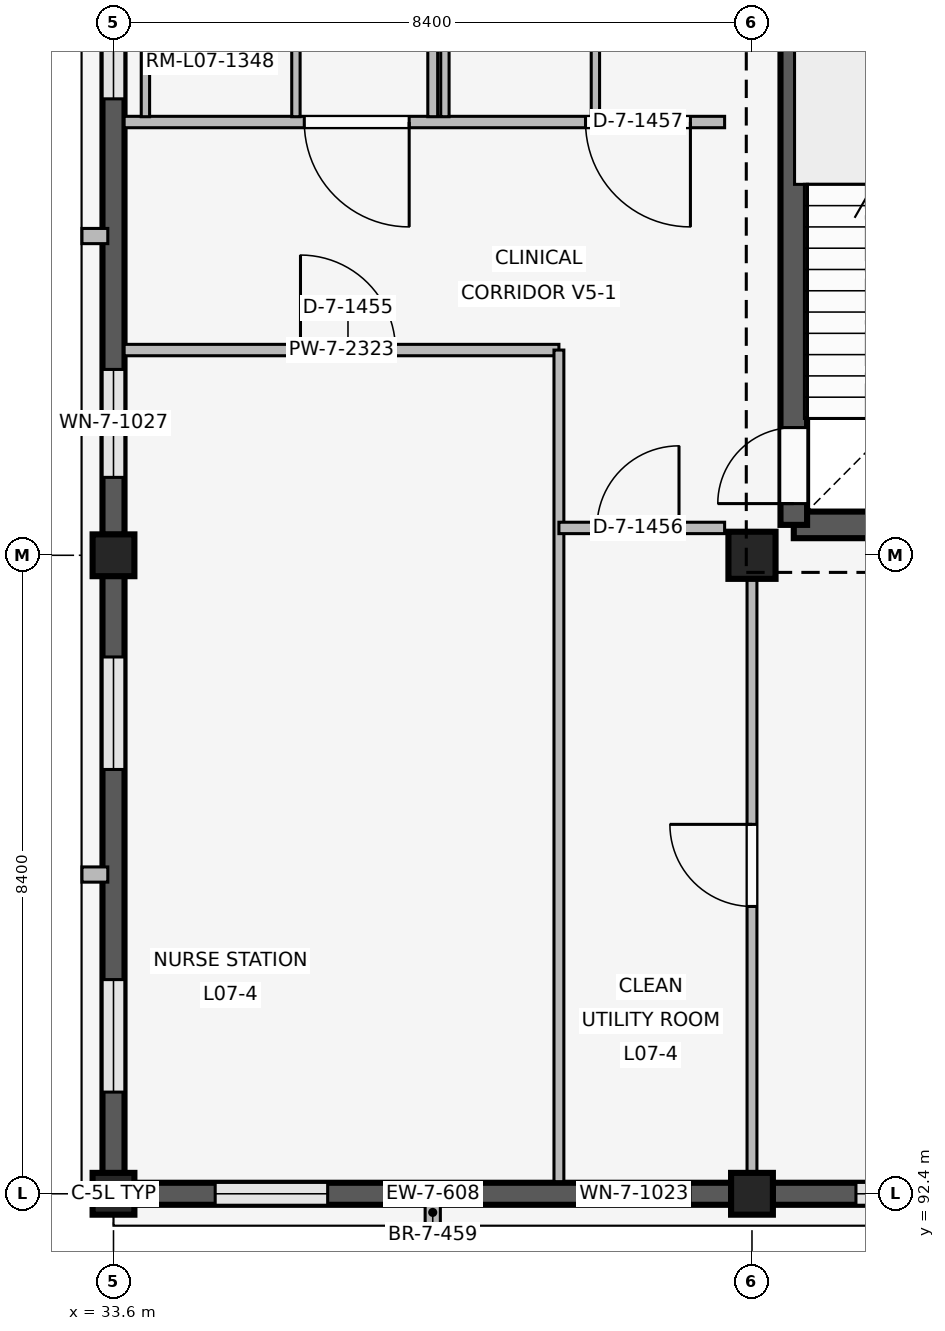
"""IFC4 building model, lengths in metres.
Left out: names, types, materials, properties, quantities, classifications, styles, units other than length and angle.
Written with IfcOpenShell. Run it as: python <this file> out.ifc"""

import sys

from ifc_helpers import new_model, si_unit, direction, frame, frame_2d, origin, origin_2d, place, context, subcontext, project, spatial, rectangle, extrude, element, fill, save


model = new_model("IFC4")
c1 = context("Model", 3, precision=1e-05, world=origin(), true_north=direction((0.0, 1.0)))
c2 = subcontext(c1, "Body", "Model", "MODEL_VIEW")
j1 = project(units=[si_unit("LENGTHUNIT", "METRE"), si_unit("PLANEANGLEUNIT", "RADIAN")], contexts=[c1])
p1 = place(None, origin())
s1 = spatial("IfcSite", under=j1, at=p1, CompositionType="ELEMENT")
p2 = place(p1, origin())
s2 = spatial("IfcBuilding", under=s1, at=p2, CompositionType="ELEMENT")
p3 = place(p2, frame((0.0, 0.0, 28.8)))
s3 = spatial("IfcBuildingStorey", under=s2, at=p3, CompositionType="ELEMENT", Elevation=28.8)
for number, where, z_axis, x_axis in (
    (1, (33.6, 92.4, 0.0), (0.0, 0.0, 1.0), (1.0, 0.0, 0.0)),
    (2, (33.6, 100.8, 0.0), (0.0, 0.0, 1.0), (1.0, 0.0, 0.0)),
    (3, (42.0, 92.4, 0.0), (0.0, 0.0, 1.0), (1.0, 0.0, 0.0)),
):
    element("IfcColumn", number, at=place(p3, frame(where, z_axis=z_axis, x_axis=x_axis)), inside=s3, PredefinedType="COLUMN", context=c2, shape_type="SweptSolid", body=[
        extrude(rectangle(XDim=0.55, YDim=0.55, at=origin_2d()), origin(), (0.0, 0.0, 1.0), 4.2),
    ])
p4 = place(p3, frame((42.0, 100.8, 0.0), z_axis=(0.0, 0.0, 1.0), x_axis=(1.0, 0.0, 0.0)))
e4 = element("IfcColumn", 4, at=p4, inside=s3, PredefinedType="COLUMN", context=c2, shape_type="SweptSolid", body=[
    extrude(rectangle(XDim=0.62, YDim=0.62, at=origin_2d()), origin(), (0.0, 0.0, 1.0), 4.2),
])
p5 = place(p3, frame((41.73, 92.4, 0.0), z_axis=(0.0, 0.0, 1.0), x_axis=(-1.0, 0.0, 0.0)))
e5 = element("IfcWall", 5, at=p5, inside=s3, PredefinedType="SOLIDWALL", context=c2, shape_type="SweptSolid", body=[
    extrude(rectangle(XDim=7.86, YDim=0.29, at=frame_2d((3.93, 0.0))), origin(), (0.0, 0.0, 1.0), 3.34),
])
p6 = place(p5, frame((0.545, 0.0, 0.85)))
e6 = element("IfcOpeningElement", 6, at=p6, cuts=e5, PredefinedType="OPENING", context=c2, shape_type="SweptSolid", body=[
    extrude(rectangle(XDim=1.48, YDim=1.6, at=frame_2d((0.74, 0.8))), frame((0.0, 0.155, 0.0), z_axis=(0.0, -1.0, 0.0), x_axis=(1.0, 0.0, 0.0)), (0.0, 0.0, 1.0), 0.31),
])
p7 = place(p5, frame((5.312, 0.0, 0.85)))
e7 = element("IfcOpeningElement", 7, at=p7, cuts=e5, PredefinedType="OPENING", context=c2, shape_type="SweptSolid", body=[
    extrude(rectangle(XDim=1.48, YDim=1.6, at=frame_2d((0.74, 0.8))), frame((0.0, 0.155, 0.0), z_axis=(0.0, -1.0, 0.0), x_axis=(1.0, 0.0, 0.0)), (0.0, 0.0, 1.0), 0.31),
])
p8 = place(p3, frame((37.8, 92.325, 0.0), z_axis=(0.0, 0.0, 1.0), x_axis=(0.0, -1.0, 0.0)))
e8 = element("IfcWall", 8, at=p8, inside=s3, PredefinedType="ELEMENTEDWALL", context=c2, shape_type="SweptSolid", body=[
    extrude(rectangle(XDim=0.34, YDim=0.2, at=frame_2d((0.17, 0.0))), origin(), (0.0, 0.0, 1.0), 3.32),
])
p9 = place(p3, frame((33.6, 92.67, 0.0), z_axis=(0.0, 0.0, 1.0), x_axis=(0.0, 1.0, 0.0)))
e9 = element("IfcWall", 9, at=p9, inside=s3, PredefinedType="SOLIDWALL", context=c2, shape_type="SweptSolid", body=[
    extrude(rectangle(XDim=7.86, YDim=0.29, at=frame_2d((3.93, 0.0))), origin(), (0.0, 0.0, 1.0), 3.34),
])
p10 = place(p9, frame((1.068, 0.0, 0.85)))
e10 = element("IfcOpeningElement", 10, at=p10, cuts=e9, PredefinedType="OPENING", context=c2, shape_type="SweptSolid", body=[
    extrude(rectangle(XDim=1.48, YDim=1.6, at=frame_2d((0.74, 0.8))), frame((0.0, 0.155, 0.0), z_axis=(0.0, -1.0, 0.0), x_axis=(1.0, 0.0, 0.0)), (0.0, 0.0, 1.0), 0.31),
])
p11 = place(p9, frame((5.312, 0.0, 0.85)))
e11 = element("IfcOpeningElement", 11, at=p11, cuts=e9, PredefinedType="OPENING", context=c2, shape_type="SweptSolid", body=[
    extrude(rectangle(XDim=1.48, YDim=1.6, at=frame_2d((0.74, 0.8))), frame((0.0, 0.155, 0.0), z_axis=(0.0, -1.0, 0.0), x_axis=(1.0, 0.0, 0.0)), (0.0, 0.0, 1.0), 0.31),
])
p12 = place(p3, frame((33.525, 96.6, 0.0), z_axis=(0.0, 0.0, 1.0), x_axis=(-1.0, 0.0, 0.0)))
e12 = element("IfcWall", 12, at=p12, inside=s3, PredefinedType="ELEMENTEDWALL", context=c2, shape_type="SweptSolid", body=[
    extrude(rectangle(XDim=0.34, YDim=0.2, at=frame_2d((0.17, 0.0))), origin(), (0.0, 0.0, 1.0), 3.32),
])
p13 = place(p3, frame((33.6, 101.07, 0.0), z_axis=(0.0, 0.0, 1.0), x_axis=(0.0, 1.0, 0.0)))
e13 = element("IfcWall", 13, at=p13, inside=s3, PredefinedType="SOLIDWALL", context=c2, shape_type="SweptSolid", body=[
    extrude(rectangle(XDim=7.86, YDim=0.29, at=frame_2d((3.93, 0.0))), origin(), (0.0, 0.0, 1.0), 3.34),
])
p14 = place(p13, frame((0.755, 0.0, 0.85)))
e14 = element("IfcOpeningElement", 14, at=p14, cuts=e13, PredefinedType="OPENING", context=c2, shape_type="SweptSolid", body=[
    extrude(rectangle(XDim=1.42, YDim=1.45, at=frame_2d((0.71, 0.725))), frame((0.0, 0.155, 0.0), z_axis=(0.0, -1.0, 0.0), x_axis=(1.0, 0.0, 0.0)), (0.0, 0.0, 1.0), 0.31),
])
p15 = place(p13, frame((5.735, 0.0, 0.85)))
e15 = element("IfcOpeningElement", 15, at=p15, cuts=e13, PredefinedType="OPENING", context=c2, shape_type="SweptSolid", body=[
    extrude(rectangle(XDim=1.42, YDim=1.45, at=frame_2d((0.71, 0.725))), frame((0.0, 0.155, 0.0), z_axis=(0.0, -1.0, 0.0), x_axis=(1.0, 0.0, 0.0)), (0.0, 0.0, 1.0), 0.31),
])
p16 = place(p3, frame((33.525, 105.0, 0.0), z_axis=(0.0, 0.0, 1.0), x_axis=(-1.0, 0.0, 0.0)))
e16 = element("IfcWall", 16, at=p16, inside=s3, PredefinedType="ELEMENTEDWALL", context=c2, shape_type="SweptSolid", body=[
    extrude(rectangle(XDim=0.34, YDim=0.2, at=frame_2d((0.17, 0.0))), origin(), (0.0, 0.0, 1.0), 3.32),
])
p17 = place(p3, frame((50.13, 92.4, 0.0), z_axis=(0.0, 0.0, 1.0), x_axis=(-1.0, 0.0, 0.0)))
e17 = element("IfcWall", 17, at=p17, inside=s3, PredefinedType="SOLIDWALL", context=c2, shape_type="SweptSolid", body=[
    extrude(rectangle(XDim=7.86, YDim=0.29, at=frame_2d((3.93, 0.0))), origin(), (0.0, 0.0, 1.0), 3.34),
])
p18 = place(p17, frame((1.098, 0.0, 0.85)))
e18 = element("IfcOpeningElement", 18, at=p18, cuts=e17, PredefinedType="OPENING", context=c2, shape_type="SweptSolid", body=[
    extrude(rectangle(XDim=1.42, YDim=1.45, at=frame_2d((0.71, 0.725))), frame((0.0, 0.155, 0.0), z_axis=(0.0, -1.0, 0.0), x_axis=(1.0, 0.0, 0.0)), (0.0, 0.0, 1.0), 0.31),
])
p19 = place(p17, frame((5.342, 0.0, 0.85)))
e19 = element("IfcOpeningElement", 19, at=p19, cuts=e17, PredefinedType="OPENING", context=c2, shape_type="SweptSolid", body=[
    extrude(rectangle(XDim=1.42, YDim=1.45, at=frame_2d((0.71, 0.725))), frame((0.0, 0.155, 0.0), z_axis=(0.0, -1.0, 0.0), x_axis=(1.0, 0.0, 0.0)), (0.0, 0.0, 1.0), 0.31),
])
p20 = place(p3, frame((42.55, 101.2, 0.0), z_axis=(0.0, 0.0, 1.0), x_axis=(1.0, 0.0, 0.0)))
e20 = element("IfcWall", 20, at=p20, inside=s3, PredefinedType="SHEAR", context=c2, shape_type="SweptSolid", body=[
    extrude(rectangle(XDim=7.5, YDim=0.35, at=frame_2d((3.75, 0.0))), origin(), (0.0, 0.0, 1.0), 3.94),
])
p21 = place(p20, frame((4.85, 0.0, 0.0)))
e21 = element("IfcOpeningElement", 21, at=p21, cuts=e20, PredefinedType="OPENING", context=c2, shape_type="SweptSolid", body=[
    extrude(rectangle(XDim=1.2, YDim=2.2, at=frame_2d((0.6, 1.1))), frame((0.0, 0.185, 0.0), z_axis=(0.0, -1.0, 0.0), x_axis=(1.0, 0.0, 0.0)), (0.0, 0.0, 1.0), 0.37),
])
p22 = place(p3, frame((42.55, 101.2, 0.0), z_axis=(0.0, 0.0, 1.0), x_axis=(0.0, 1.0, 0.0)))
e22 = element("IfcWall", 22, at=p22, inside=s3, PredefinedType="SHEAR", context=c2, shape_type="SweptSolid", body=[
    extrude(rectangle(XDim=7.55, YDim=0.35, at=frame_2d((3.775, 0.0))), origin(), (0.0, 0.0, 1.0), 3.94),
])
p23 = place(p22, frame((0.28, 0.0, 0.0)))
e23 = element("IfcOpeningElement", 23, at=p23, cuts=e22, PredefinedType="OPENING", context=c2, shape_type="SweptSolid", body=[
    extrude(rectangle(XDim=1.0, YDim=2.15, at=frame_2d((0.5, 1.075))), frame((0.0, 0.185, 0.0), z_axis=(0.0, -1.0, 0.0), x_axis=(1.0, 0.0, 0.0)), (0.0, 0.0, 1.0), 0.37),
])
p24 = place(p3, frame((33.74, 103.5, 0.0), z_axis=(0.0, 0.0, 1.0), x_axis=(1.0, 0.0, 0.0)))
e24 = element("IfcWall", 24, at=p24, inside=s3, PredefinedType="PARTITIONING", context=c2, shape_type="SweptSolid", body=[
    extrude(rectangle(XDim=5.72, YDim=0.15, at=frame_2d((2.86, 0.0))), origin(), (0.0, 0.0, 1.0), 3.32),
])
p25 = place(p24, frame((2.32, 0.0, 0.0)))
e25 = element("IfcOpeningElement", 25, at=p25, cuts=e24, PredefinedType="OPENING", context=c2, shape_type="SweptSolid", body=[
    extrude(rectangle(XDim=1.25, YDim=2.2, at=frame_2d((0.625, 1.1))), frame((0.0, 0.085, 0.0), z_axis=(0.0, -1.0, 0.0), x_axis=(1.0, 0.0, 0.0)), (0.0, 0.0, 1.0), 0.17),
])
p26 = place(p3, frame((39.46, 92.56, 0.0), z_axis=(0.0, 0.0, 1.0), x_axis=(0.0, 1.0, 0.0)))
e26 = element("IfcWall", 26, at=p26, inside=s3, PredefinedType="PARTITIONING", context=c2, shape_type="SweptSolid", body=[
    extrude(rectangle(XDim=10.94, YDim=0.13, at=frame_2d((5.47, 0.0))), origin(), (0.0, 0.0, 1.0), 3.32),
])
p27 = place(p3, frame((39.46, 101.16, 0.0), z_axis=(0.0, 0.0, 1.0), x_axis=(1.0, 0.0, 0.0)))
e27 = element("IfcWall", 27, at=p27, inside=s3, PredefinedType="PARTITIONING", context=c2, shape_type="SweptSolid", body=[
    extrude(rectangle(XDim=2.18, YDim=0.15, at=frame_2d((1.09, 0.0))), origin(), (0.0, 0.0, 1.0), 3.32),
])
p28 = place(p27, frame((0.5, 0.0, 0.0)))
e28 = element("IfcOpeningElement", 28, at=p28, cuts=e27, PredefinedType="OPENING", context=c2, shape_type="SweptSolid", body=[
    extrude(rectangle(XDim=1.08, YDim=2.15, at=frame_2d((0.54, 1.075))), frame((0.0, 0.085, 0.0), z_axis=(0.0, -1.0, 0.0), x_axis=(1.0, 0.0, 0.0)), (0.0, 0.0, 1.0), 0.17),
])
p29 = place(p3, frame((41.64, 106.5, 0.0), z_axis=(0.0, 0.0, 1.0), x_axis=(-1.0, 0.0, 0.0)))
e29 = element("IfcWall", 29, at=p29, inside=s3, PredefinedType="PARTITIONING", context=c2, shape_type="SweptSolid", body=[
    extrude(rectangle(XDim=7.9, YDim=0.15, at=frame_2d((3.95, 0.0))), origin(), (0.0, 0.0, 1.0), 3.32),
])
p30 = place(p29, frame((0.45, 0.0, 0.0)))
e30 = element("IfcOpeningElement", 30, at=p30, cuts=e29, PredefinedType="OPENING", context=c2, shape_type="SweptSolid", body=[
    extrude(rectangle(XDim=1.38, YDim=2.25, at=frame_2d((0.69, 1.125))), frame((0.0, 0.085, 0.0), z_axis=(0.0, -1.0, 0.0), x_axis=(1.0, 0.0, 0.0)), (0.0, 0.0, 1.0), 0.17),
])
p31 = place(p29, frame((4.15, 0.0, 0.0)))
e31 = element("IfcOpeningElement", 31, at=p31, cuts=e29, PredefinedType="OPENING", context=c2, shape_type="SweptSolid", body=[
    extrude(rectangle(XDim=1.38, YDim=2.25, at=frame_2d((0.69, 1.125))), frame((0.0, 0.085, 0.0), z_axis=(0.0, -1.0, 0.0), x_axis=(1.0, 0.0, 0.0)), (0.0, 0.0, 1.0), 0.17),
])
p32 = place(p3, frame((37.8, 106.57, 0.0), z_axis=(0.0, 0.0, 1.0), x_axis=(0.0, 1.0, 0.0)))
e32 = element("IfcWall", 32, at=p32, inside=s3, PredefinedType="PARTITIONING", context=c2, shape_type="SweptSolid", body=[
    extrude(rectangle(XDim=10.93, YDim=0.13, at=frame_2d((5.465, 0.0))), origin(), (0.0, 0.0, 1.0), 3.32),
])
for number, where, z_axis, x_axis in (
    (33, (34.02, 106.57, 0.0), (0.0, 0.0, 1.0), (0.0, 1.0, 0.0)),
    (34, (36.0, 106.57, 0.0), (0.0, 0.0, 1.0), (0.0, 1.0, 0.0)),
    (35, (37.96, 106.57, 0.0), (0.0, 0.0, 1.0), (0.0, 1.0, 0.0)),
    (36, (39.94, 106.57, 0.0), (0.0, 0.0, 1.0), (0.0, 1.0, 0.0)),
):
    element("IfcWall", number, at=place(p3, frame(where, z_axis=z_axis, x_axis=x_axis)), inside=s3, PredefinedType="PARTITIONING", context=c2, shape_type="SweptSolid", body=[
        extrude(rectangle(XDim=2.61, YDim=0.11, at=frame_2d((1.305, 0.0))), origin(), (0.0, 0.0, 1.0), 3.32),
    ])
p33 = place(p3, frame((42.0, 92.54, 0.0), z_axis=(0.0, 0.0, 1.0), x_axis=(0.0, 1.0, 0.0)))
e37 = element("IfcWall", 37, at=p33, inside=s3, PredefinedType="PARTITIONING", context=c2, shape_type="SweptSolid", body=[
    extrude(rectangle(XDim=8.21, YDim=0.13, at=frame_2d((4.105, 0.0))), origin(), (0.0, 0.0, 1.0), 3.32),
])
p34 = place(p33, frame((3.64, 0.0, 0.0)))
e38 = element("IfcOpeningElement", 38, at=p34, cuts=e37, PredefinedType="OPENING", context=c2, shape_type="SweptSolid", body=[
    extrude(rectangle(XDim=1.08, YDim=2.15, at=frame_2d((0.54, 1.075))), frame((0.0, 0.075, 0.0), z_axis=(0.0, -1.0, 0.0), x_axis=(1.0, 0.0, 0.0)), (0.0, 0.0, 1.0), 0.15),
])
p35 = place(p6, origin())
e39 = element("IfcWindow", 39, at=p35, inside=s3, PartitioningType="SINGLE_PANEL", PredefinedType="WINDOW", context=c2, shape_type="SweptSolid", body=[
    extrude(rectangle(XDim=1.48, YDim=1.6, at=frame_2d((0.74, 0.8))), frame((0.0, 0.03, 0.0), z_axis=(0.0, -1.0, 0.0), x_axis=(1.0, 0.0, 0.0)), (0.0, 0.0, 1.0), 0.06),
])
fill(e6, e39)
p36 = place(p7, origin())
e40 = element("IfcWindow", 40, at=p36, inside=s3, PartitioningType="SINGLE_PANEL", PredefinedType="WINDOW", context=c2, shape_type="SweptSolid", body=[
    extrude(rectangle(XDim=1.48, YDim=1.6, at=frame_2d((0.74, 0.8))), frame((0.0, 0.03, 0.0), z_axis=(0.0, -1.0, 0.0), x_axis=(1.0, 0.0, 0.0)), (0.0, 0.0, 1.0), 0.06),
])
fill(e7, e40)
p37 = place(p10, origin())
e41 = element("IfcWindow", 41, at=p37, inside=s3, PartitioningType="SINGLE_PANEL", PredefinedType="WINDOW", context=c2, shape_type="SweptSolid", body=[
    extrude(rectangle(XDim=1.48, YDim=1.6, at=frame_2d((0.74, 0.8))), frame((0.0, 0.03, 0.0), z_axis=(0.0, -1.0, 0.0), x_axis=(1.0, 0.0, 0.0)), (0.0, 0.0, 1.0), 0.06),
])
fill(e10, e41)
p38 = place(p11, origin())
e42 = element("IfcWindow", 42, at=p38, inside=s3, PartitioningType="SINGLE_PANEL", PredefinedType="WINDOW", context=c2, shape_type="SweptSolid", body=[
    extrude(rectangle(XDim=1.48, YDim=1.6, at=frame_2d((0.74, 0.8))), frame((0.0, 0.03, 0.0), z_axis=(0.0, -1.0, 0.0), x_axis=(1.0, 0.0, 0.0)), (0.0, 0.0, 1.0), 0.06),
])
fill(e11, e42)
p39 = place(p14, origin())
e43 = element("IfcWindow", 43, at=p39, inside=s3, PartitioningType="SINGLE_PANEL", PredefinedType="WINDOW", context=c2, shape_type="SweptSolid", body=[
    extrude(rectangle(XDim=1.42, YDim=1.45, at=frame_2d((0.71, 0.725))), frame((0.0, 0.03, 0.0), z_axis=(0.0, -1.0, 0.0), x_axis=(1.0, 0.0, 0.0)), (0.0, 0.0, 1.0), 0.06),
])
fill(e14, e43)
p40 = place(p15, origin())
e44 = element("IfcWindow", 44, at=p40, inside=s3, PartitioningType="SINGLE_PANEL", PredefinedType="WINDOW", context=c2, shape_type="SweptSolid", body=[
    extrude(rectangle(XDim=1.42, YDim=1.45, at=frame_2d((0.71, 0.725))), frame((0.0, 0.03, 0.0), z_axis=(0.0, -1.0, 0.0), x_axis=(1.0, 0.0, 0.0)), (0.0, 0.0, 1.0), 0.06),
])
fill(e15, e44)
p41 = place(p19, origin())
e45 = element("IfcWindow", 45, at=p41, inside=s3, PartitioningType="SINGLE_PANEL", PredefinedType="WINDOW", context=c2, shape_type="SweptSolid", body=[
    extrude(rectangle(XDim=1.42, YDim=1.45, at=frame_2d((0.71, 0.725))), frame((0.0, 0.03, 0.0), z_axis=(0.0, -1.0, 0.0), x_axis=(1.0, 0.0, 0.0)), (0.0, 0.0, 1.0), 0.06),
])
fill(e19, e45)
p42 = place(p23, origin())
e46 = element("IfcDoor", 46, at=p42, inside=s3, OperationType="SINGLE_SWING_LEFT", PredefinedType="DOOR", context=c2, shape_type="SweptSolid", body=[
    extrude(rectangle(XDim=1.0, YDim=2.15, at=frame_2d((0.5, 1.075))), frame((0.0, 0.025, 0.0), z_axis=(0.0, -1.0, 0.0), x_axis=(1.0, 0.0, 0.0)), (0.0, 0.0, 1.0), 0.05),
])
fill(e23, e46)
p43 = place(p25, origin())
e47 = element("IfcDoor", 47, at=p43, inside=s3, OperationType="SINGLE_SWING_LEFT", PredefinedType="DOOR", context=c2, shape_type="SweptSolid", body=[
    extrude(rectangle(XDim=1.25, YDim=2.2, at=frame_2d((0.625, 1.1))), frame((0.0, 0.025, 0.0), z_axis=(0.0, -1.0, 0.0), x_axis=(1.0, 0.0, 0.0)), (0.0, 0.0, 1.0), 0.05),
])
fill(e25, e47)
p44 = place(p28, origin())
e48 = element("IfcDoor", 48, at=p44, inside=s3, OperationType="SINGLE_SWING_RIGHT", PredefinedType="DOOR", context=c2, shape_type="SweptSolid", body=[
    extrude(rectangle(XDim=1.08, YDim=2.15, at=frame_2d((0.54, 1.075))), frame((0.0, 0.025, 0.0), z_axis=(0.0, -1.0, 0.0), x_axis=(1.0, 0.0, 0.0)), (0.0, 0.0, 1.0), 0.05),
])
fill(e28, e48)
p45 = place(p30, origin())
e49 = element("IfcDoor", 49, at=p45, inside=s3, OperationType="SINGLE_SWING_LEFT", PredefinedType="DOOR", context=c2, shape_type="SweptSolid", body=[
    extrude(rectangle(XDim=1.38, YDim=2.25, at=frame_2d((0.69, 1.125))), frame((0.0, 0.025, 0.0), z_axis=(0.0, -1.0, 0.0), x_axis=(1.0, 0.0, 0.0)), (0.0, 0.0, 1.0), 0.05),
])
fill(e30, e49)
p46 = place(p31, origin())
e50 = element("IfcDoor", 50, at=p46, inside=s3, OperationType="SINGLE_SWING_LEFT", PredefinedType="DOOR", context=c2, shape_type="SweptSolid", body=[
    extrude(rectangle(XDim=1.38, YDim=2.25, at=frame_2d((0.69, 1.125))), frame((0.0, 0.025, 0.0), z_axis=(0.0, -1.0, 0.0), x_axis=(1.0, 0.0, 0.0)), (0.0, 0.0, 1.0), 0.05),
])
fill(e31, e50)
p47 = place(p34, origin())
e51 = element("IfcDoor", 51, at=p47, inside=s3, OperationType="SINGLE_SWING_RIGHT", PredefinedType="DOOR", context=c2, shape_type="SweptSolid", body=[
    extrude(rectangle(XDim=1.08, YDim=2.15, at=frame_2d((0.54, 1.075))), frame((0.0, 0.025, 0.0), z_axis=(0.0, -1.0, 0.0), x_axis=(1.0, 0.0, 0.0)), (0.0, 0.0, 1.0), 0.05),
])
fill(e38, e51)
save(model, sys.argv[1])
